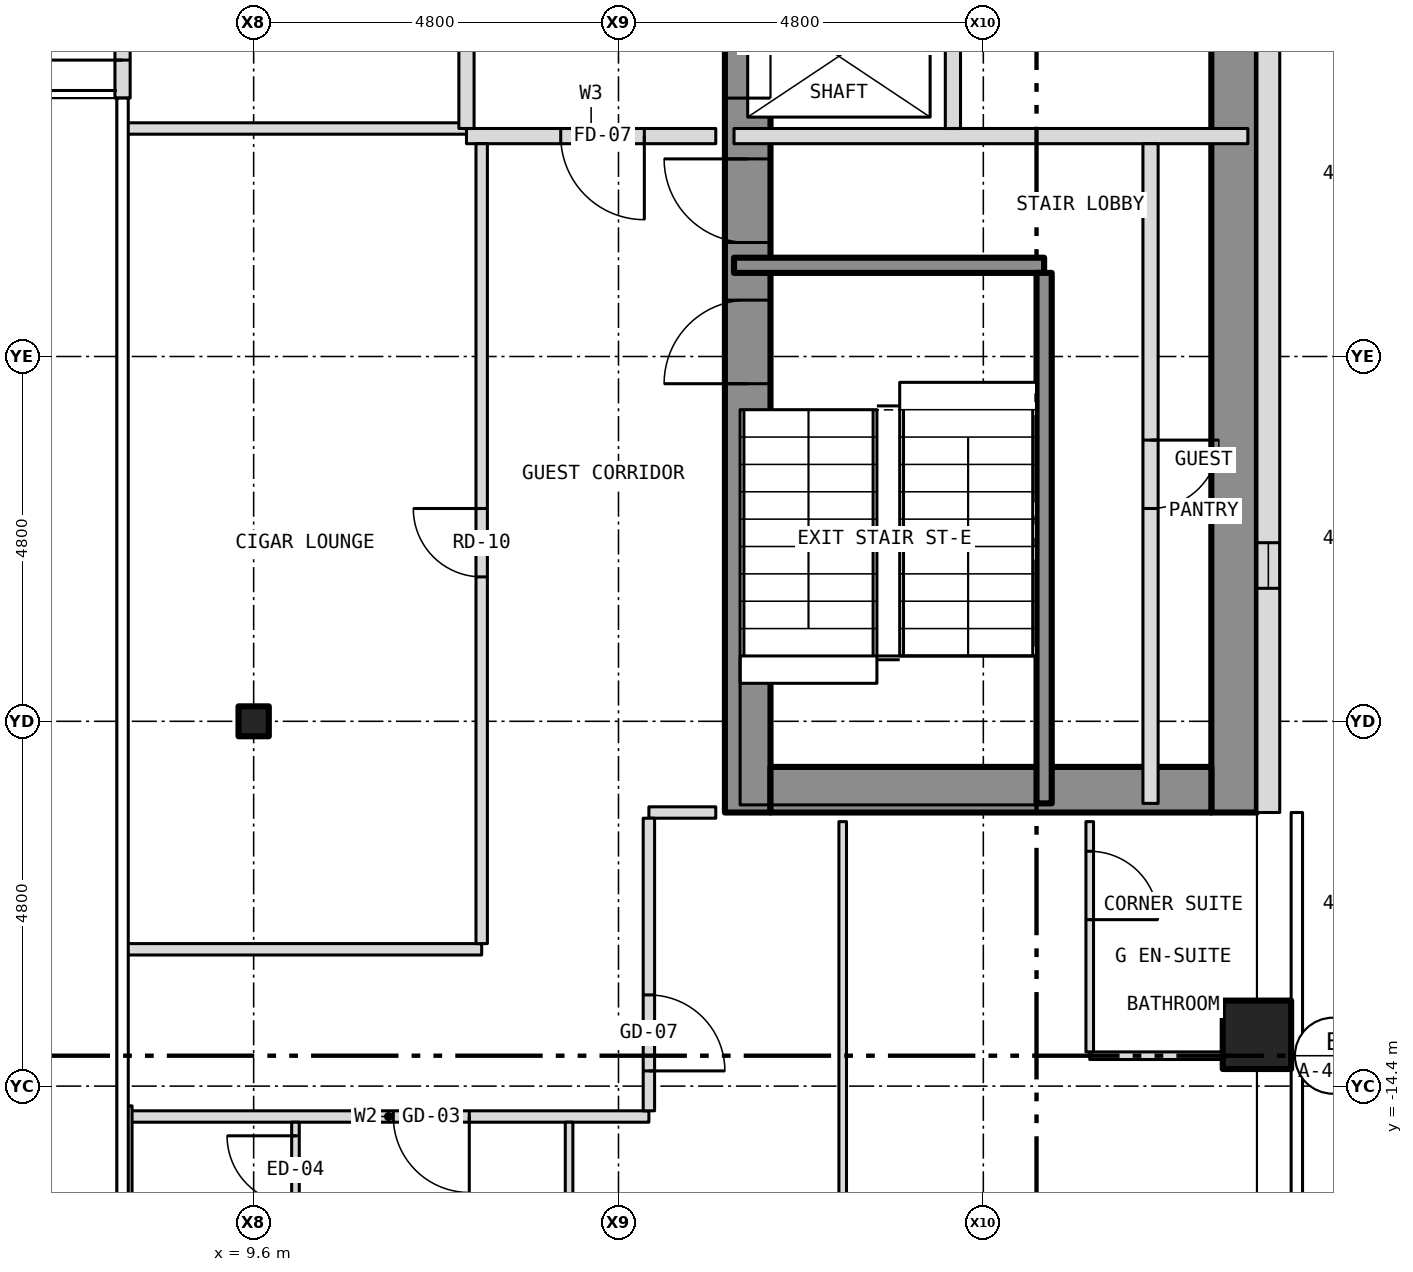
"""IFC4 building model, lengths in metres.
Left out: names, types, materials, properties, quantities, classifications, styles, units other than length and angle.
Written with IfcOpenShell. Run it as: python <this file> out.ifc"""

import sys

from ifc_helpers import new_model, si_unit, direction, frame, frame_2d, origin, origin_2d, place, context, subcontext, project, spatial, rectangle, hollow_rectangle, i_section, extrude, element, fill, save


model = new_model("IFC4")
c1 = context("Model", 3, precision=1e-05, world=origin(), true_north=direction((0.0, 1.0)))
c2 = subcontext(c1, "Body", "Model", "MODEL_VIEW")
j1 = project(units=[si_unit("LENGTHUNIT", "METRE"), si_unit("PLANEANGLEUNIT", "RADIAN")], contexts=[c1])
p1 = place(None, origin())
s1 = spatial("IfcSite", under=j1, at=p1, CompositionType="ELEMENT")
p2 = place(p1, origin())
s2 = spatial("IfcBuilding", under=s1, at=p2, CompositionType="ELEMENT")
p3 = place(p2, frame((0.0, 0.0, 127.5)))
s3 = spatial("IfcBuildingStorey", under=s2, at=p3, CompositionType="ELEMENT", Elevation=127.5)
p4 = place(p3, frame((22.8, -13.725, -0.15), z_axis=(0.0, 0.0, 1.0), x_axis=(1.0, 0.0, 0.0)))
e1 = element("IfcColumn", 1, at=p4, inside=s3, PredefinedType="COLUMN", context=c2, shape_type="SweptSolid", body=[
    extrude(hollow_rectangle(XDim=0.9, YDim=0.9, WallThickness=0.05, at=origin_2d()), origin(), (0.0, 0.0, 1.0), 3.5),
])
p5 = place(p3, frame((9.6, -9.6, -0.15), z_axis=(0.0, 0.0, 1.0), x_axis=(1.0, 0.0, 0.0)))
e2 = element("IfcColumn", 2, at=p5, inside=s3, PredefinedType="COLUMN", context=c2, shape_type="SweptSolid", body=[
    extrude(i_section(OverallWidth=0.399, OverallDepth=0.394, WebThickness=0.023, FlangeThickness=0.037, at=origin_2d()), origin(), (0.0, 0.0, 1.0), 3.5),
])
p6 = place(p3, frame((16.1, -10.8, 0.0), z_axis=(0.0, 0.0, 1.0), x_axis=(0.0, 1.0, 0.0)))
e3 = element("IfcWall", 3, at=p6, inside=s3, PredefinedType="SHEAR", context=c2, shape_type="SweptSolid", body=[
    extrude(rectangle(XDim=21.6, YDim=0.6, at=frame_2d((10.8, 0.0))), origin(), (0.0, 0.0, 1.0), 3.25),
])
p7 = place(p6, frame((9.4, 0.0, 0.0)))
e4 = element("IfcOpeningElement", 4, at=p7, cuts=e3, PredefinedType="OPENING", context=c2, shape_type="SweptSolid", body=[
    extrude(rectangle(XDim=1.1, YDim=2.1, at=frame_2d((0.55, 1.05))), frame((0.0, 0.312, 0.0), z_axis=(0.0, -1.0, 0.0), x_axis=(1.0, 0.0, 0.0)), (0.0, 0.0, 1.0), 0.624),
])
p8 = place(p6, frame((11.5, 0.0, 0.0)))
e5 = element("IfcOpeningElement", 5, at=p8, cuts=e3, PredefinedType="OPENING", context=c2, shape_type="SweptSolid", body=[
    extrude(rectangle(XDim=1.1, YDim=2.1, at=frame_2d((0.55, 1.05))), frame((0.0, 0.312, 0.0), z_axis=(0.0, -1.0, 0.0), x_axis=(1.0, 0.0, 0.0)), (0.0, 0.0, 1.0), 0.624),
])
p9 = place(p6, frame((13.6, 0.0, 0.0)))
e6 = element("IfcOpeningElement", 6, at=p9, cuts=e3, PredefinedType="OPENING", context=c2, shape_type="SweptSolid", body=[
    extrude(rectangle(XDim=1.1, YDim=2.1, at=frame_2d((0.55, 1.05))), frame((0.0, 0.312, 0.0), z_axis=(0.0, -1.0, 0.0), x_axis=(1.0, 0.0, 0.0)), (0.0, 0.0, 1.0), 0.624),
])
p10 = place(p6, frame((15.7, 0.0, 0.0)))
e7 = element("IfcOpeningElement", 7, at=p10, cuts=e3, PredefinedType="OPENING", context=c2, shape_type="SweptSolid", body=[
    extrude(rectangle(XDim=1.1, YDim=2.1, at=frame_2d((0.55, 1.05))), frame((0.0, 0.312, 0.0), z_axis=(0.0, -1.0, 0.0), x_axis=(1.0, 0.0, 0.0)), (0.0, 0.0, 1.0), 0.624),
])
p11 = place(p6, frame((17.8, 0.0, 0.0)))
e8 = element("IfcOpeningElement", 8, at=p11, cuts=e3, PredefinedType="OPENING", context=c2, shape_type="SweptSolid", body=[
    extrude(rectangle(XDim=1.1, YDim=2.1, at=frame_2d((0.55, 1.05))), frame((0.0, 0.312, 0.0), z_axis=(0.0, -1.0, 0.0), x_axis=(1.0, 0.0, 0.0)), (0.0, 0.0, 1.0), 0.624),
])
p12 = place(p6, frame((5.642, 0.0, 0.0)))
e9 = element("IfcOpeningElement", 9, at=p12, cuts=e3, PredefinedType="OPENING", context=c2, shape_type="SweptSolid", body=[
    extrude(rectangle(XDim=1.1, YDim=2.1, at=frame_2d((0.55, 1.05))), frame((0.0, 0.312, 0.0), z_axis=(0.0, -1.0, 0.0), x_axis=(1.0, 0.0, 0.0)), (0.0, 0.0, 1.0), 0.624),
])
p13 = place(p6, frame((7.5, 0.0, 0.0)))
e10 = element("IfcOpeningElement", 10, at=p13, cuts=e3, PredefinedType="OPENING", context=c2, shape_type="SweptSolid", body=[
    extrude(rectangle(XDim=1.1, YDim=2.1, at=frame_2d((0.55, 1.05))), frame((0.0, 0.312, 0.0), z_axis=(0.0, -1.0, 0.0), x_axis=(1.0, 0.0, 0.0)), (0.0, 0.0, 1.0), 0.624),
])
p14 = place(p3, frame((22.5, -10.8, 0.0), z_axis=(0.0, 0.0, 1.0), x_axis=(0.0, 1.0, 0.0)))
e11 = element("IfcWall", 11, at=p14, inside=s3, PredefinedType="SHEAR", context=c2, shape_type="SweptSolid", body=[
    extrude(rectangle(XDim=21.6, YDim=0.6, at=frame_2d((10.8, 0.0))), origin(), (0.0, 0.0, 1.0), 3.25),
])
p15 = place(p3, frame((16.4, -10.5, 0.0), z_axis=(0.0, 0.0, 1.0), x_axis=(1.0, 0.0, 0.0)))
e12 = element("IfcWall", 12, at=p15, inside=s3, PredefinedType="SHEAR", context=c2, shape_type="SweptSolid", body=[
    extrude(rectangle(XDim=5.8, YDim=0.6, at=frame_2d((2.9, 0.0))), origin(), (0.0, 0.0, 1.0), 3.25),
])
p16 = place(p3, frame((22.95, -10.8, 0.0), z_axis=(0.0, 0.0, 1.0), x_axis=(0.0, 1.0, 0.0)))
e13 = element("IfcWall", 13, at=p16, inside=s3, PredefinedType="SOLIDWALL", context=c2, shape_type="SweptSolid", body=[
    extrude(rectangle(XDim=21.6, YDim=0.3, at=frame_2d((10.8, 0.0))), origin(), (0.0, 0.0, 1.0), 3.5),
])
p17 = place(p16, frame((2.95, 0.0, 1.0)))
e14 = element("IfcOpeningElement", 14, at=p17, cuts=e13, PredefinedType="OPENING", context=c2, shape_type="SweptSolid", body=[
    extrude(rectangle(XDim=0.6, YDim=1.5, at=frame_2d((0.3, 0.75))), frame((0.0, 0.162, 0.0), z_axis=(0.0, -1.0, 0.0), x_axis=(1.0, 0.0, 0.0)), (0.0, 0.0, 1.0), 0.324),
])
p18 = place(p3, frame((7.875, -1.4, 0.0), z_axis=(0.0, 0.0, 1.0), x_axis=(0.0, 1.0, 0.0)))
e15 = element("IfcWall", 15, at=p18, inside=s3, PredefinedType="SOLIDWALL", context=c2, shape_type="SweptSolid", body=[
    extrude(rectangle(XDim=2.8, YDim=0.2, at=frame_2d((1.4, 0.0))), origin(), (0.0, 0.0, 1.0), 3.5),
])
p19 = place(p18, frame((0.5, 0.0, 0.0)))
e16 = element("IfcOpeningElement", 16, at=p19, cuts=e15, PredefinedType="OPENING", context=c2, shape_type="SweptSolid", body=[
    extrude(rectangle(XDim=1.8, YDim=2.1, at=frame_2d((0.9, 1.05))), frame((0.0, 0.112, 0.0), z_axis=(0.0, -1.0, 0.0), x_axis=(1.0, 0.0, 0.0)), (0.0, 0.0, 1.0), 0.224),
])
p20 = place(p3, frame((7.95, -14.8, 0.0), z_axis=(0.0, 0.0, 1.0), x_axis=(1.0, 0.0, 0.0)))
e17 = element("IfcWall", 17, at=p20, inside=s3, PredefinedType="PARTITIONING", context=c2, shape_type="SweptSolid", body=[
    extrude(rectangle(XDim=6.85, YDim=0.15, at=frame_2d((3.425, 0.0))), origin(), (0.0, 0.0, 1.0), 3.35),
])
p21 = place(p20, frame((3.487, 0.0, 0.0)))
e18 = element("IfcOpeningElement", 18, at=p21, cuts=e17, PredefinedType="OPENING", context=c2, shape_type="SweptSolid", body=[
    extrude(rectangle(XDim=1.0, YDim=2.1, at=frame_2d((0.5, 1.05))), frame((0.0, 0.087, 0.0), z_axis=(0.0, -1.0, 0.0), x_axis=(1.0, 0.0, 0.0)), (0.0, 0.0, 1.0), 0.174),
])
p22 = place(p3, frame((20.6, -14.0, 0.0), z_axis=(0.0, 0.0, 1.0), x_axis=(1.0, 0.0, 0.0)))
e19 = element("IfcWall", 19, at=p22, inside=s3, PredefinedType="PARTITIONING", context=c2, shape_type="SweptSolid", body=[
    extrude(rectangle(XDim=2.08, YDim=0.1, at=frame_2d((1.04, 0.0))), origin(), (0.0, 0.0, 1.0), 3.35),
])
p23 = place(p3, frame((7.92, -12.6, 0.0), z_axis=(0.0, 0.0, 1.0), x_axis=(1.0, 0.0, 0.0)))
e20 = element("IfcWall", 20, at=p23, inside=s3, PredefinedType="PARTITIONING", context=c2, shape_type="SweptSolid", body=[
    extrude(rectangle(XDim=4.68, YDim=0.15, at=frame_2d((2.34, 0.0))), origin(), (0.0, 0.0, 1.0), 3.35),
])
p24 = place(p3, frame((14.8, -10.8, 0.0), z_axis=(0.0, 0.0, 1.0), x_axis=(1.0, 0.0, 0.0)))
e21 = element("IfcWall", 21, at=p24, inside=s3, PredefinedType="PARTITIONING", context=c2, shape_type="SweptSolid", body=[
    extrude(rectangle(XDim=0.88, YDim=0.15, at=frame_2d((0.44, 0.0))), origin(), (0.0, 0.0, 1.0), 3.35),
])
p25 = place(p3, frame((15.92, -3.6, 0.0), z_axis=(0.0, 0.0, 1.0), x_axis=(1.0, 0.0, 0.0)))
e22 = element("IfcWall", 22, at=p25, inside=s3, PredefinedType="SHEAR", context=c2, shape_type="SweptSolid", body=[
    extrude(rectangle(XDim=4.08, YDim=0.2, at=frame_2d((2.04, 0.0))), origin(), (0.0, 0.0, 1.0), 3.25),
])
p26 = place(p3, frame((12.4, -1.9, 0.0), z_axis=(0.0, 0.0, 1.0), x_axis=(1.0, 0.0, 0.0)))
e23 = element("IfcWall", 23, at=p26, inside=s3, PredefinedType="PARTITIONING", context=c2, shape_type="SweptSolid", body=[
    extrude(rectangle(XDim=3.28, YDim=0.2, at=frame_2d((1.64, 0.0))), origin(), (0.0, 0.0, 1.0), 3.35),
])
p27 = place(p26, frame((1.24, 0.0, 0.0)))
e24 = element("IfcOpeningElement", 24, at=p27, cuts=e23, PredefinedType="OPENING", context=c2, shape_type="SweptSolid", body=[
    extrude(rectangle(XDim=1.1, YDim=2.1, at=frame_2d((0.55, 1.05))), frame((0.0, 0.112, 0.0), z_axis=(0.0, -1.0, 0.0), x_axis=(1.0, 0.0, 0.0)), (0.0, 0.0, 1.0), 0.224),
])
p28 = place(p3, frame((15.92, -1.9, 0.0), z_axis=(0.0, 0.0, 1.0), x_axis=(1.0, 0.0, 0.0)))
e25 = element("IfcWall", 25, at=p28, inside=s3, PredefinedType="PARTITIONING", context=c2, shape_type="SweptSolid", body=[
    extrude(rectangle(XDim=6.76, YDim=0.2, at=frame_2d((3.38, 0.0))), origin(), (0.0, 0.0, 1.0), 3.25),
])
p29 = place(p3, frame((7.92, -1.8, 0.0), z_axis=(0.0, 0.0, 1.0), x_axis=(1.0, 0.0, 0.0)))
e26 = element("IfcWall", 26, at=p29, inside=s3, PredefinedType="PARTITIONING", context=c2, shape_type="SweptSolid", body=[
    extrude(rectangle(XDim=4.48, YDim=0.15, at=frame_2d((2.24, 0.0))), origin(), (0.0, 0.0, 1.0), 3.35),
])
p30 = place(p3, frame((7.95, -18.14, 0.0), z_axis=(0.0, 0.0, 1.0), x_axis=(0.0, 1.0, 0.0)))
e27 = element("IfcWall", 27, at=p30, inside=s3, PredefinedType="PARTITIONING", context=c2, shape_type="SweptSolid", body=[
    extrude(rectangle(XDim=3.48, YDim=0.1, at=frame_2d((1.74, 0.0))), origin(), (0.0, 0.0, 1.0), 2.733),
])
p31 = place(p3, frame((10.15, -17.95, 0.0), z_axis=(0.0, 0.0, 1.0), x_axis=(0.0, 1.0, 0.0)))
e28 = element("IfcWall", 28, at=p31, inside=s3, PredefinedType="PARTITIONING", context=c2, shape_type="SweptSolid", body=[
    extrude(rectangle(XDim=3.075, YDim=0.1, at=frame_2d((1.538, 0.0))), origin(), (0.0, 0.0, 1.0), 3.35),
])
p32 = place(p31, frame((1.996, 0.0, 0.0)))
e29 = element("IfcOpeningElement", 29, at=p32, cuts=e28, PredefinedType="OPENING", context=c2, shape_type="SweptSolid", body=[
    extrude(rectangle(XDim=0.9, YDim=2.1, at=frame_2d((0.45, 1.05))), frame((0.0, 0.062, 0.0), z_axis=(0.0, -1.0, 0.0), x_axis=(1.0, 0.0, 0.0)), (0.0, 0.0, 1.0), 0.124),
])
p33 = place(p3, frame((12.4, -1.8, 0.0), z_axis=(0.0, 0.0, 1.0), x_axis=(0.0, 1.0, 0.0)))
e30 = element("IfcWall", 30, at=p33, inside=s3, PredefinedType="PARTITIONING", context=c2, shape_type="SweptSolid", body=[
    extrude(rectangle(XDim=4.0, YDim=0.2, at=frame_2d((2.0, 0.0))), origin(), (0.0, 0.0, 1.0), 3.35),
])
p34 = place(p33, frame((1.25, 0.0, 0.0)))
e31 = element("IfcOpeningElement", 31, at=p34, cuts=e30, PredefinedType="OPENING", context=c2, shape_type="SweptSolid", body=[
    extrude(rectangle(XDim=1.1, YDim=2.1, at=frame_2d((0.55, 1.05))), frame((0.0, 0.112, 0.0), z_axis=(0.0, -1.0, 0.0), x_axis=(1.0, 0.0, 0.0)), (0.0, 0.0, 1.0), 0.224),
])
p35 = place(p3, frame((12.6, -12.525, 0.0), z_axis=(0.0, 0.0, 1.0), x_axis=(0.0, 1.0, 0.0)))
e32 = element("IfcWall", 32, at=p35, inside=s3, PredefinedType="PARTITIONING", context=c2, shape_type="SweptSolid", body=[
    extrude(rectangle(XDim=10.525, YDim=0.15, at=frame_2d((5.262, 0.0))), origin(), (0.0, 0.0, 1.0), 3.35),
])
p36 = place(p35, frame((4.825, 0.0, 0.0)))
e33 = element("IfcOpeningElement", 33, at=p36, cuts=e32, PredefinedType="OPENING", context=c2, shape_type="SweptSolid", body=[
    extrude(rectangle(XDim=0.9, YDim=2.1, at=frame_2d((0.45, 1.05))), frame((0.0, 0.087, 0.0), z_axis=(0.0, -1.0, 0.0), x_axis=(1.0, 0.0, 0.0)), (0.0, 0.0, 1.0), 0.174),
])
p37 = place(p3, frame((13.75, -22.68, 0.0), z_axis=(0.0, 0.0, 1.0), x_axis=(0.0, 1.0, 0.0)))
e34 = element("IfcWall", 34, at=p37, inside=s3, PredefinedType="PARTITIONING", context=c2, shape_type="SweptSolid", body=[
    extrude(rectangle(XDim=7.805, YDim=0.1, at=frame_2d((3.902, 0.0))), origin(), (0.0, 0.0, 1.0), 3.35),
])
p38 = place(p3, frame((14.8, -14.725, 0.0), z_axis=(0.0, 0.0, 1.0), x_axis=(0.0, 1.0, 0.0)))
e35 = element("IfcWall", 35, at=p38, inside=s3, PredefinedType="PARTITIONING", context=c2, shape_type="SweptSolid", body=[
    extrude(rectangle(XDim=3.85, YDim=0.15, at=frame_2d((1.925, 0.0))), origin(), (0.0, 0.0, 1.0), 3.35),
])
p39 = place(p38, frame((0.525, 0.0, 0.0)))
e36 = element("IfcOpeningElement", 36, at=p39, cuts=e35, PredefinedType="OPENING", context=c2, shape_type="SweptSolid", body=[
    extrude(rectangle(XDim=1.0, YDim=2.1, at=frame_2d((0.5, 1.05))), frame((0.0, 0.087, 0.0), z_axis=(0.0, -1.0, 0.0), x_axis=(1.0, 0.0, 0.0)), (0.0, 0.0, 1.0), 0.174),
])
p40 = place(p3, frame((17.35, -23.28, 0.0), z_axis=(0.0, 0.0, 1.0), x_axis=(0.0, 1.0, 0.0)))
e37 = element("IfcWall", 37, at=p40, inside=s3, PredefinedType="PARTITIONING", context=c2, shape_type="SweptSolid", body=[
    extrude(rectangle(XDim=12.36, YDim=0.1, at=frame_2d((6.18, 0.0))), origin(), (0.0, 0.0, 1.0), 3.35),
])
p41 = place(p40, frame((6.03, 0.0, 0.0)))
e38 = element("IfcOpeningElement", 38, at=p41, cuts=e37, PredefinedType="OPENING", context=c2, shape_type="SweptSolid", body=[
    extrude(rectangle(XDim=0.9, YDim=2.1, at=frame_2d((0.45, 1.05))), frame((0.0, 0.062, 0.0), z_axis=(0.0, -1.0, 0.0), x_axis=(1.0, 0.0, 0.0)), (0.0, 0.0, 1.0), 0.124),
])
p42 = place(p3, frame((18.8, -1.8, 0.0), z_axis=(0.0, 0.0, 1.0), x_axis=(0.0, 1.0, 0.0)))
e39 = element("IfcWall", 39, at=p42, inside=s3, PredefinedType="PARTITIONING", context=c2, shape_type="SweptSolid", body=[
    extrude(rectangle(XDim=12.48, YDim=0.2, at=frame_2d((6.24, 0.0))), origin(), (0.0, 0.0, 1.0), 3.25),
])
p43 = place(p3, frame((20.0, -10.68, 0.0), z_axis=(0.0, 0.0, 1.0), x_axis=(0.0, 1.0, 0.0)))
e40 = element("IfcWall", 40, at=p43, inside=s3, PredefinedType="SHEAR", context=c2, shape_type="SweptSolid", body=[
    extrude(rectangle(XDim=6.98, YDim=0.2, at=frame_2d((3.49, 0.0))), origin(), (0.0, 0.0, 1.0), 3.25),
])
p44 = place(p3, frame((20.6, -13.95, 0.0), z_axis=(0.0, 0.0, 1.0), x_axis=(0.0, 1.0, 0.0)))
e41 = element("IfcWall", 41, at=p44, inside=s3, PredefinedType="PARTITIONING", context=c2, shape_type="SweptSolid", body=[
    extrude(rectangle(XDim=3.03, YDim=0.1, at=frame_2d((1.515, 0.0))), origin(), (0.0, 0.0, 1.0), 3.35),
])
p45 = place(p44, frame((1.74, 0.0, 0.0)))
e42 = element("IfcOpeningElement", 42, at=p45, cuts=e41, PredefinedType="OPENING", context=c2, shape_type="SweptSolid", body=[
    extrude(rectangle(XDim=0.9, YDim=2.1, at=frame_2d((0.45, 1.05))), frame((0.0, 0.062, 0.0), z_axis=(0.0, -1.0, 0.0), x_axis=(1.0, 0.0, 0.0)), (0.0, 0.0, 1.0), 0.124),
])
p46 = place(p3, frame((21.4, -10.68, 0.0), z_axis=(0.0, 0.0, 1.0), x_axis=(0.0, 1.0, 0.0)))
e43 = element("IfcWall", 43, at=p46, inside=s3, PredefinedType="PARTITIONING", context=c2, shape_type="SweptSolid", body=[
    extrude(rectangle(XDim=8.68, YDim=0.2, at=frame_2d((4.34, 0.0))), origin(), (0.0, 0.0, 1.0), 3.25),
])
p47 = place(p46, frame((3.88, 0.0, 0.0)))
e44 = element("IfcOpeningElement", 44, at=p47, cuts=e43, PredefinedType="OPENING", context=c2, shape_type="SweptSolid", body=[
    extrude(rectangle(XDim=0.9, YDim=2.1, at=frame_2d((0.45, 1.05))), frame((0.0, 0.112, 0.0), z_axis=(0.0, -1.0, 0.0), x_axis=(1.0, 0.0, 0.0)), (0.0, 0.0, 1.0), 0.224),
])
p48 = place(p17, origin())
e45 = element("IfcWindow", 45, at=p48, inside=s3, PartitioningType="SINGLE_PANEL", PredefinedType="WINDOW", context=c2, shape_type="SweptSolid", body=[
    extrude(rectangle(XDim=0.6, YDim=1.5, at=frame_2d((0.3, 0.75))), frame((0.0, -0.06, 0.0), z_axis=(0.0, -1.0, 0.0), x_axis=(1.0, 0.0, 0.0)), (0.0, 0.0, 1.0), 0.06),
])
fill(e14, e45)
p49 = place(p19, origin())
e46 = element("IfcDoor", 46, at=p49, inside=s3, OperationType="DOUBLE_DOOR_DOUBLE_SWING", PredefinedType="DOOR", context=c2, shape_type="SweptSolid", body=[
    extrude(rectangle(XDim=1.8, YDim=2.1, at=frame_2d((0.9, 1.05))), frame((0.0, 0.025, 0.0), z_axis=(0.0, -1.0, 0.0), x_axis=(1.0, 0.0, 0.0)), (0.0, 0.0, 1.0), 0.05),
])
fill(e16, e46)
p50 = place(p7, origin())
e47 = element("IfcDoor", 47, at=p50, inside=s3, OperationType="SLIDING_TO_LEFT", PredefinedType="DOOR", context=c2, shape_type="SweptSolid", body=[
    extrude(rectangle(XDim=1.1, YDim=2.1, at=frame_2d((0.55, 1.05))), frame((0.0, 0.025, 0.0), z_axis=(0.0, -1.0, 0.0), x_axis=(1.0, 0.0, 0.0)), (0.0, 0.0, 1.0), 0.05),
])
fill(e4, e47)
p51 = place(p12, origin())
e48 = element("IfcDoor", 48, at=p51, inside=s3, OperationType="SINGLE_SWING_LEFT", PredefinedType="DOOR", context=c2, shape_type="SweptSolid", body=[
    extrude(rectangle(XDim=1.1, YDim=2.1, at=frame_2d((0.55, 1.05))), frame((0.0, 0.025, 0.0), z_axis=(0.0, -1.0, 0.0), x_axis=(1.0, 0.0, 0.0)), (0.0, 0.0, 1.0), 0.05),
])
fill(e9, e48)
p52 = place(p13, origin())
e49 = element("IfcDoor", 49, at=p52, inside=s3, OperationType="SINGLE_SWING_RIGHT", PredefinedType="DOOR", context=c2, shape_type="SweptSolid", body=[
    extrude(rectangle(XDim=1.1, YDim=2.1, at=frame_2d((0.55, 1.05))), frame((0.0, 0.025, 0.0), z_axis=(0.0, -1.0, 0.0), x_axis=(1.0, 0.0, 0.0)), (0.0, 0.0, 1.0), 0.05),
])
fill(e10, e49)
p53 = place(p47, origin())
e50 = element("IfcDoor", 50, at=p53, inside=s3, OperationType="SINGLE_SWING_RIGHT", PredefinedType="DOOR", context=c2, shape_type="SweptSolid", body=[
    extrude(rectangle(XDim=0.9, YDim=2.1, at=frame_2d((0.45, 1.05))), frame((0.0, 0.025, 0.0), z_axis=(0.0, -1.0, 0.0), x_axis=(1.0, 0.0, 0.0)), (0.0, 0.0, 1.0), 0.05),
])
fill(e44, e50)
p54 = place(p27, origin())
e51 = element("IfcDoor", 51, at=p54, inside=s3, OperationType="SINGLE_SWING_RIGHT", PredefinedType="DOOR", context=c2, shape_type="SweptSolid", body=[
    extrude(rectangle(XDim=1.1, YDim=2.1, at=frame_2d((0.55, 1.05))), frame((0.0, 0.025, 0.0), z_axis=(0.0, -1.0, 0.0), x_axis=(1.0, 0.0, 0.0)), (0.0, 0.0, 1.0), 0.05),
])
fill(e24, e51)
p55 = place(p21, origin())
e52 = element("IfcDoor", 52, at=p55, inside=s3, OperationType="SINGLE_SWING_RIGHT", PredefinedType="DOOR", context=c2, shape_type="SweptSolid", body=[
    extrude(rectangle(XDim=1.0, YDim=2.1, at=frame_2d((0.5, 1.05))), frame((0.0, 0.025, 0.0), z_axis=(0.0, -1.0, 0.0), x_axis=(1.0, 0.0, 0.0)), (0.0, 0.0, 1.0), 0.05),
])
fill(e18, e52)
p56 = place(p32, origin())
e53 = element("IfcDoor", 53, at=p56, inside=s3, OperationType="SINGLE_SWING_RIGHT", PredefinedType="DOOR", context=c2, shape_type="SweptSolid", body=[
    extrude(rectangle(XDim=0.9, YDim=2.1, at=frame_2d((0.45, 1.05))), frame((0.0, 0.025, 0.0), z_axis=(0.0, -1.0, 0.0), x_axis=(1.0, 0.0, 0.0)), (0.0, 0.0, 1.0), 0.05),
])
fill(e29, e53)
p57 = place(p39, origin())
e54 = element("IfcDoor", 54, at=p57, inside=s3, OperationType="SINGLE_SWING_LEFT", PredefinedType="DOOR", context=c2, shape_type="SweptSolid", body=[
    extrude(rectangle(XDim=1.0, YDim=2.1, at=frame_2d((0.5, 1.05))), frame((0.0, 0.025, 0.0), z_axis=(0.0, -1.0, 0.0), x_axis=(1.0, 0.0, 0.0)), (0.0, 0.0, 1.0), 0.05),
])
fill(e36, e54)
p58 = place(p45, origin())
e55 = element("IfcDoor", 55, at=p58, inside=s3, OperationType="SINGLE_SWING_LEFT", PredefinedType="DOOR", context=c2, shape_type="SweptSolid", body=[
    extrude(rectangle(XDim=0.9, YDim=2.1, at=frame_2d((0.45, 1.05))), frame((0.0, 0.025, 0.0), z_axis=(0.0, -1.0, 0.0), x_axis=(1.0, 0.0, 0.0)), (0.0, 0.0, 1.0), 0.05),
])
fill(e42, e55)
p59 = place(p36, origin())
e56 = element("IfcDoor", 56, at=p59, inside=s3, OperationType="SINGLE_SWING_RIGHT", PredefinedType="DOOR", context=c2, shape_type="SweptSolid", body=[
    extrude(rectangle(XDim=0.9, YDim=2.1, at=frame_2d((0.45, 1.05))), frame((0.0, 0.025, 0.0), z_axis=(0.0, -1.0, 0.0), x_axis=(1.0, 0.0, 0.0)), (0.0, 0.0, 1.0), 0.05),
])
fill(e33, e56)
save(model, sys.argv[1])
